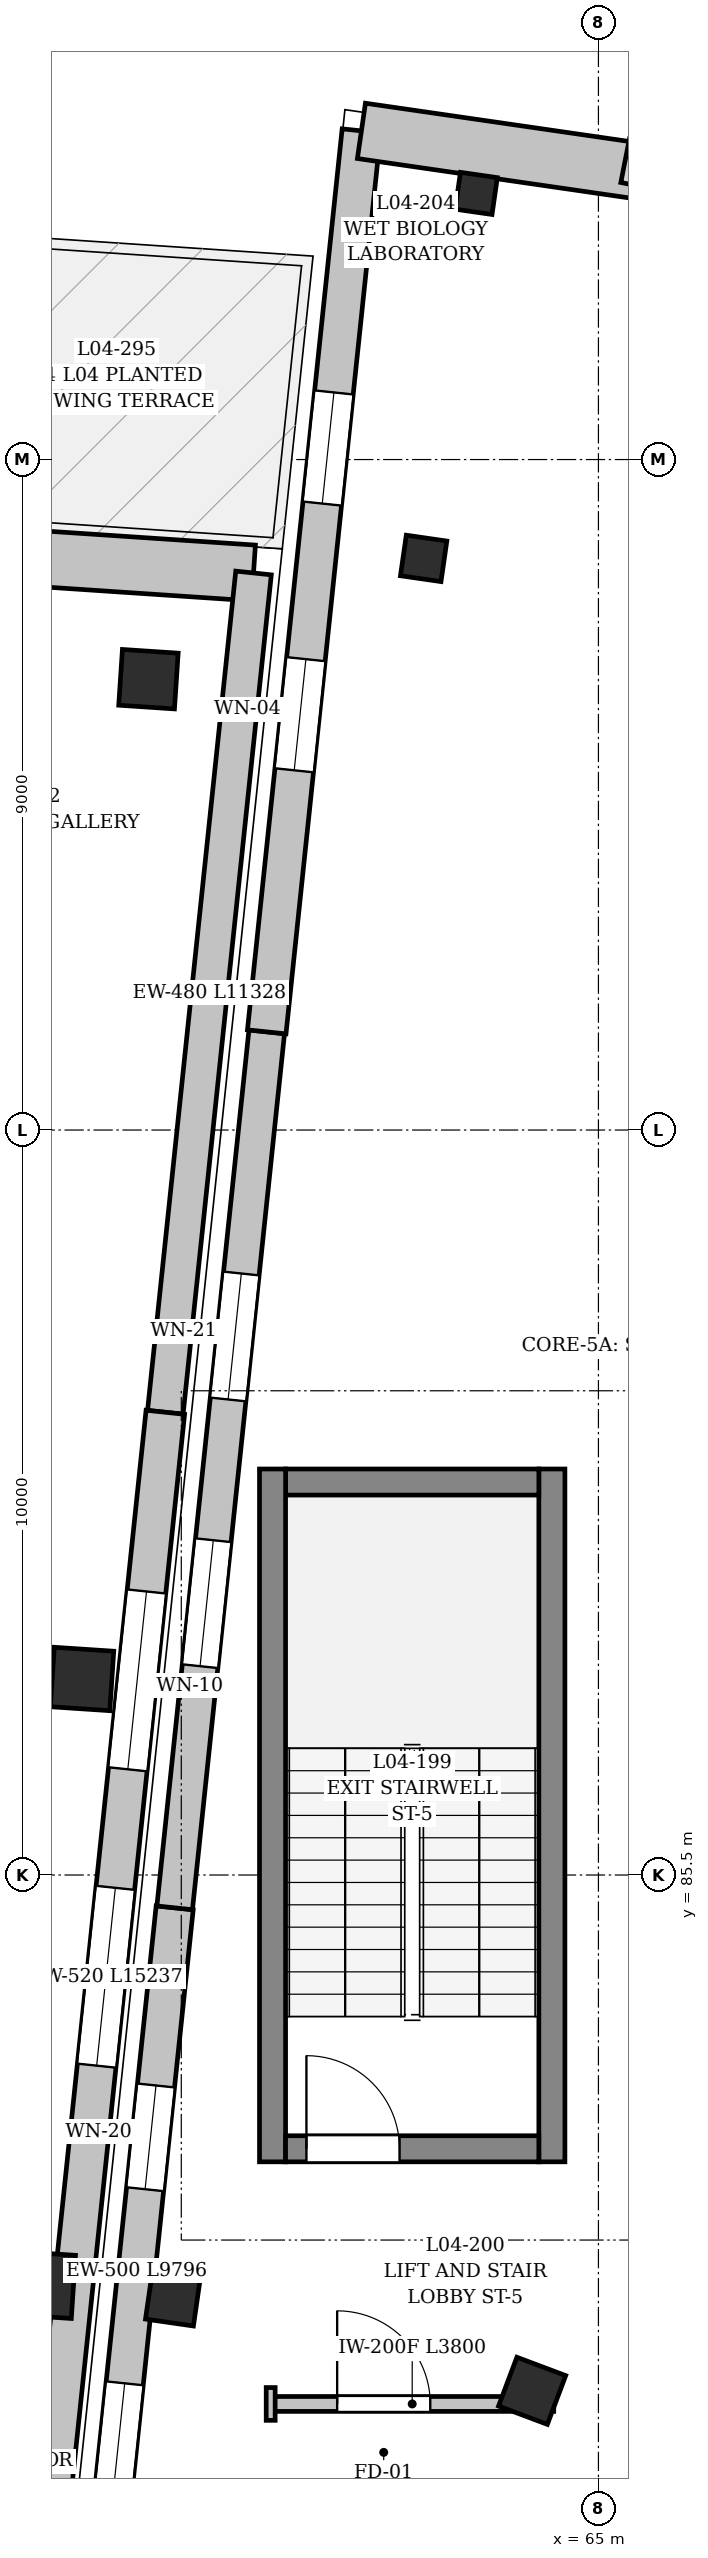
"""IFC4 building model, lengths in metres.
Left out: names, types, materials, properties, quantities, classifications, styles, units other than length and angle.
Written with IfcOpenShell. Run it as: python <this file> out.ifc"""

import sys

from ifc_helpers import new_model, si_unit, direction, frame, frame_2d, origin, origin_2d, place, context, subcontext, project, spatial, rectangle, extrude, element, fill, save


model = new_model("IFC4")
c1 = context("Model", 3, precision=1e-05, world=origin(), true_north=direction((0.0, 1.0)))
c2 = subcontext(c1, "Body", "Model", "MODEL_VIEW")
j1 = project(units=[si_unit("LENGTHUNIT", "METRE"), si_unit("PLANEANGLEUNIT", "RADIAN")], contexts=[c1])
p1 = place(None, origin())
s1 = spatial("IfcSite", under=j1, at=p1, CompositionType="ELEMENT")
p2 = place(p1, origin())
s2 = spatial("IfcBuilding", under=s1, at=p2, CompositionType="ELEMENT")
p3 = place(p2, frame((0.0, 0.0, 15.0)))
s3 = spatial("IfcBuildingStorey", under=s2, at=p3, CompositionType="ELEMENT", Elevation=15.0)
p4 = place(p3, frame((57.528, 79.999, 0.0), z_axis=(0.0, 0.0, 1.0), x_axis=(0.0662739004, 0.997801468292, 0.0)))
e1 = element("IfcColumn", 1, at=p4, inside=s3, PredefinedType="COLUMN", context=c2, shape_type="SweptSolid", body=[
    extrude(rectangle(XDim=0.85, YDim=0.85, at=origin_2d()), origin(), (0.0, 0.0, 1.0), 4.58),
])
p5 = place(p3, frame((58.068, 88.131, 0.0), z_axis=(0.0, 0.0, 1.0), x_axis=(0.0662739004, 0.997801468292, 0.0)))
e2 = element("IfcColumn", 2, at=p5, inside=s3, PredefinedType="COLUMN", context=c2, shape_type="SweptSolid", body=[
    extrude(rectangle(XDim=0.8, YDim=0.8, at=origin_2d()), origin(), (0.0, 0.0, 1.0), 4.58),
])
p6 = place(p3, frame((58.959, 101.552, 0.0), z_axis=(0.0, 0.0, 1.0), x_axis=(0.0662739004, 0.997801468292, 0.0)))
e3 = element("IfcColumn", 3, at=p6, inside=s3, PredefinedType="COLUMN", context=c2, shape_type="SweptSolid", body=[
    extrude(rectangle(XDim=0.75, YDim=0.75, at=origin_2d()), origin(), (0.0, 0.0, 1.0), 4.58),
])
p7 = place(p3, frame((64.11, 78.576, 0.0), z_axis=(0.0, 0.0, 1.0), x_axis=(0.351841648405, 0.936059535739, 0.0)))
e4 = element("IfcColumn", 4, at=p7, inside=s3, PredefinedType="COLUMN", context=c2, shape_type="SweptSolid", body=[
    extrude(rectangle(XDim=0.7, YDim=0.7, at=origin_2d()), origin(), (0.0, 0.0, 1.0), 4.52),
])
p8 = place(p3, frame((59.288, 79.814, 0.0), z_axis=(0.0, 0.0, 1.0), x_axis=(0.142628933706, 0.989776230908, 0.0)))
e5 = element("IfcColumn", 5, at=p8, inside=s3, PredefinedType="COLUMN", context=c2, shape_type="SweptSolid", body=[
    extrude(rectangle(XDim=0.65, YDim=0.65, at=origin_2d()), origin(), (0.0, 0.0, 1.0), 4.52),
])
p9 = place(p3, frame((62.654, 103.173, 0.0), z_axis=(0.0, 0.0, 1.0), x_axis=(0.142628933706, 0.989776230908, 0.0)))
e6 = element("IfcColumn", 6, at=p9, inside=s3, PredefinedType="COLUMN", context=c2, shape_type="SweptSolid", body=[
    extrude(rectangle(XDim=0.55, YDim=0.55, at=origin_2d()), origin(), (0.0, 0.0, 1.0), 4.52),
])
p10 = place(p3, frame((63.36, 108.073, 0.0), z_axis=(0.0, 0.0, 1.0), x_axis=(0.142628933706, 0.989776230908, 0.0)))
e7 = element("IfcColumn", 7, at=p10, inside=s3, PredefinedType="COLUMN", context=c2, shape_type="SweptSolid", body=[
    extrude(rectangle(XDim=0.5, YDim=0.5, at=origin_2d()), origin(), (0.0, 0.0, 1.0), 4.52),
])
p11 = place(p3, frame((57.344, 103.18, 0.0), z_axis=(0.0, 0.0, 1.0), x_axis=(0.997765524506, -0.066812858841, 0.0)))
e8 = element("IfcWall", 8, at=p11, inside=s3, PredefinedType="SOLIDWALL", context=c2, shape_type="SweptSolid", body=[
    extrude(rectangle(XDim=3.033, YDim=0.75, at=frame_2d((1.517, 0.0))), origin(), (0.0, 0.0, 1.0), 4.753),
])
p12 = place(p3, frame((60.37, 102.978, 0.0), z_axis=(0.0, 0.0, 1.0), x_axis=(-0.104525478139, -0.994522209113, 0.0)))
e9 = element("IfcWall", 9, at=p12, inside=s3, PredefinedType="SOLIDWALL", context=c2, shape_type="SweptSolid", body=[
    extrude(rectangle(XDim=11.328, YDim=0.48, at=frame_2d((5.664, 0.0))), origin(), (0.0, 0.0, 1.0), 6.833),
])
p13 = place(p3, frame((59.186, 91.711, 0.0), z_axis=(0.0, 0.0, 1.0), x_axis=(-0.104529652015, -0.994521770425, 0.0)))
e10 = element("IfcWall", 10, at=p13, inside=s3, PredefinedType="SOLIDWALL", context=c2, shape_type="SweptSolid", body=[
    extrude(rectangle(XDim=15.238, YDim=0.52, at=frame_2d((7.619, 0.0))), origin(), (0.0, 0.0, 1.0), 4.753),
])
p14 = place(p13, frame((2.419, 0.0, 0.9)))
e11 = element("IfcOpeningElement", 11, at=p14, cuts=e10, PredefinedType="OPENING", context=c2, shape_type="SweptSolid", body=[
    extrude(rectangle(XDim=2.4, YDim=1.1, at=frame_2d((1.2, 0.55))), frame((0.0, 0.27, 0.0), z_axis=(0.0, -1.0, 0.0), x_axis=(1.0, 0.0, 0.0)), (0.0, 0.0, 1.0), 0.54),
])
p15 = place(p13, frame((6.419, 0.0, 0.9)))
e12 = element("IfcOpeningElement", 12, at=p15, cuts=e10, PredefinedType="OPENING", context=c2, shape_type="SweptSolid", body=[
    extrude(rectangle(XDim=2.4, YDim=1.1, at=frame_2d((1.2, 0.55))), frame((0.0, 0.27, 0.0), z_axis=(0.0, -1.0, 0.0), x_axis=(1.0, 0.0, 0.0)), (0.0, 0.0, 1.0), 0.54),
])
p16 = place(p3, frame((58.287, 75.317, 0.0), z_axis=(0.0, 0.0, 1.0), x_axis=(0.104523915148, 0.994522373384, 0.0)))
e13 = element("IfcWall", 13, at=p16, inside=s3, PredefinedType="SOLIDWALL", context=c2, shape_type="SweptSolid", body=[
    extrude(rectangle(XDim=9.796, YDim=0.5, at=frame_2d((4.898, 0.0))), origin(), (0.0, 0.0, 1.0), 3.66),
])
p17 = place(p16, frame((1.978, 0.0, 0.9)))
e14 = element("IfcOpeningElement", 14, at=p17, cuts=e13, PredefinedType="OPENING", context=c2, shape_type="SweptSolid", body=[
    extrude(rectangle(XDim=1.4, YDim=2.05, at=frame_2d((0.7, 1.025))), frame((0.0, 0.26, 0.0), z_axis=(0.0, -1.0, 0.0), x_axis=(1.0, 0.0, 0.0)), (0.0, 0.0, 1.0), 0.52),
])
p18 = place(p16, frame((5.998, 0.0, 0.9)))
e15 = element("IfcOpeningElement", 15, at=p18, cuts=e13, PredefinedType="OPENING", context=c2, shape_type="SweptSolid", body=[
    extrude(rectangle(XDim=1.4, YDim=2.05, at=frame_2d((0.7, 1.025))), frame((0.0, 0.26, 0.0), z_axis=(0.0, -1.0, 0.0), x_axis=(1.0, 0.0, 0.0)), (0.0, 0.0, 1.0), 0.52),
])
p19 = place(p3, frame((59.311, 85.06, 0.0), z_axis=(0.0, 0.0, 1.0), x_axis=(0.104529993567, 0.994521734526, 0.0)))
e16 = element("IfcWall", 16, at=p19, inside=s3, PredefinedType="SOLIDWALL", context=c2, shape_type="SweptSolid", body=[
    extrude(rectangle(XDim=11.823, YDim=0.48, at=frame_2d((5.911, 0.0))), origin(), (0.0, 0.0, 1.0), 4.52),
])
p20 = place(p19, frame((3.261, 0.0, 0.9)))
e17 = element("IfcOpeningElement", 17, at=p20, cuts=e16, PredefinedType="OPENING", context=c2, shape_type="SweptSolid", body=[
    extrude(rectangle(XDim=1.7, YDim=1.55, at=frame_2d((0.85, 0.775))), frame((0.0, 0.25, 0.0), z_axis=(0.0, -1.0, 0.0), x_axis=(1.0, 0.0, 0.0)), (0.0, 0.0, 1.0), 0.5),
])
p21 = place(p19, frame((6.861, 0.0, 0.9)))
e18 = element("IfcOpeningElement", 18, at=p21, cuts=e16, PredefinedType="OPENING", context=c2, shape_type="SweptSolid", body=[
    extrude(rectangle(XDim=1.7, YDim=1.55, at=frame_2d((0.85, 0.775))), frame((0.0, 0.25, 0.0), z_axis=(0.0, -1.0, 0.0), x_axis=(1.0, 0.0, 0.0)), (0.0, 0.0, 1.0), 0.5),
])
p22 = place(p3, frame((60.547, 96.818, 0.0), z_axis=(0.0, 0.0, 1.0), x_axis=(0.104517571645, 0.994523040064, 0.0)))
e19 = element("IfcWall", 19, at=p22, inside=s3, PredefinedType="SOLIDWALL", context=c2, shape_type="SweptSolid", body=[
    extrude(rectangle(XDim=12.161, YDim=0.52, at=frame_2d((6.08, 0.0))), origin(), (0.0, 0.0, 1.0), 4.52),
])
p23 = place(p22, frame((3.531, 0.0, 0.9)))
e20 = element("IfcOpeningElement", 20, at=p23, cuts=e19, PredefinedType="OPENING", context=c2, shape_type="SweptSolid", body=[
    extrude(rectangle(XDim=1.5, YDim=2.1, at=frame_2d((0.75, 1.05))), frame((0.0, 0.27, 0.0), z_axis=(0.0, -1.0, 0.0), x_axis=(1.0, 0.0, 0.0)), (0.0, 0.0, 1.0), 0.54),
])
p24 = place(p22, frame((7.13, 0.0, 0.9)))
e21 = element("IfcOpeningElement", 21, at=p24, cuts=e19, PredefinedType="OPENING", context=c2, shape_type="SweptSolid", body=[
    extrude(rectangle(XDim=1.5, YDim=2.1, at=frame_2d((0.75, 1.05))), frame((0.0, 0.27, 0.0), z_axis=(0.0, -1.0, 0.0), x_axis=(1.0, 0.0, 0.0)), (0.0, 0.0, 1.0), 0.54),
])
p25 = place(p3, frame((61.818, 108.912, 0.0), z_axis=(0.0, 0.0, 1.0), x_axis=(0.989656438185, -0.143457779009, 0.0)))
e22 = element("IfcWall", 22, at=p25, inside=s3, PredefinedType="SOLIDWALL", context=c2, shape_type="SweptSolid", body=[
    extrude(rectangle(XDim=3.742, YDim=0.75, at=frame_2d((1.871, 0.0))), origin(), (0.0, 0.0, 1.0), 3.11),
])
p26 = place(p3, frame((64.375, 81.65, 0.0), z_axis=(0.0, 0.0, 1.0), x_axis=(0.0, 1.0, 0.0)))
e23 = element("IfcWall", 23, at=p26, inside=s3, PredefinedType="SHEAR", context=c2, shape_type="SweptSolid", body=[
    extrude(rectangle(XDim=9.3, YDim=0.35, at=frame_2d((4.65, 0.0))), origin(), (0.0, 0.0, 1.0), 4.52),
])
p27 = place(p3, frame((64.2, 90.775, 0.0), z_axis=(0.0, 0.0, 1.0), x_axis=(-1.0, 0.0, 0.0)))
e24 = element("IfcWall", 24, at=p27, inside=s3, PredefinedType="SHEAR", context=c2, shape_type="SweptSolid", body=[
    extrude(rectangle(XDim=3.4, YDim=0.35, at=frame_2d((1.7, 0.0))), origin(), (0.0, 0.0, 1.0), 4.52),
])
p28 = place(p3, frame((60.625, 90.95, 0.0), z_axis=(0.0, 0.0, 1.0), x_axis=(0.0, -1.0, 0.0)))
e25 = element("IfcWall", 25, at=p28, inside=s3, PredefinedType="SHEAR", context=c2, shape_type="SweptSolid", body=[
    extrude(rectangle(XDim=9.3, YDim=0.35, at=frame_2d((4.65, 0.0))), origin(), (0.0, 0.0, 1.0), 4.52),
])
p29 = place(p3, frame((60.8, 81.825, 0.0), z_axis=(0.0, 0.0, 1.0), x_axis=(1.0, 0.0, 0.0)))
e26 = element("IfcWall", 26, at=p29, inside=s3, PredefinedType="SHEAR", context=c2, shape_type="SweptSolid", body=[
    extrude(rectangle(XDim=3.4, YDim=0.35, at=frame_2d((1.7, 0.0))), origin(), (0.0, 0.0, 1.0), 4.52),
])
p30 = place(p29, frame((0.28, 0.0, 0.0)))
e27 = element("IfcOpeningElement", 27, at=p30, cuts=e26, PredefinedType="OPENING", context=c2, shape_type="SweptSolid", body=[
    extrude(rectangle(XDim=1.25, YDim=2.2, at=frame_2d((0.625, 1.1))), frame((0.0, 0.185, 0.0), z_axis=(0.0, -1.0, 0.0), x_axis=(1.0, 0.0, 0.0)), (0.0, 0.0, 1.0), 0.37),
])
p31 = place(p3, frame((60.6, 78.4, 0.0), z_axis=(0.0, 0.0, 1.0), x_axis=(1.0, 0.0, 0.0)))
e28 = element("IfcWall", 28, at=p31, inside=s3, PredefinedType="PARTITIONING", context=c2, shape_type="SweptSolid", body=[
    extrude(rectangle(XDim=3.8, YDim=0.2, at=frame_2d((1.9, 0.0))), origin(), (0.0, 0.0, 1.0), 3.11),
])
p32 = place(p31, frame((0.893, 0.0, 0.0)))
e29 = element("IfcOpeningElement", 29, at=p32, cuts=e28, PredefinedType="OPENING", context=c2, shape_type="SweptSolid", body=[
    extrude(rectangle(XDim=1.25, YDim=2.2, at=frame_2d((0.625, 1.1))), frame((0.0, 0.11, 0.0), z_axis=(0.0, -1.0, 0.0), x_axis=(1.0, 0.0, 0.0)), (0.0, 0.0, 1.0), 0.22),
])
p33 = place(p3, frame((60.6, 78.18, 0.0), z_axis=(0.0, 0.0, 1.0), x_axis=(0.0, 1.0, 0.0)))
e30 = element("IfcWall", 30, at=p33, inside=s3, PredefinedType="PARTITIONING", context=c2, shape_type="SweptSolid", body=[
    extrude(rectangle(XDim=0.44, YDim=0.12, at=frame_2d((0.22, 0.0))), origin(), (0.0, 0.0, 1.0), 3.83),
])
p34 = place(p14, origin())
e31 = element("IfcWindow", 31, at=p34, inside=s3, PartitioningType="DOUBLE_PANEL_HORIZONTAL", PredefinedType="LIGHTDOME", context=c2, shape_type="SweptSolid", body=[
    extrude(rectangle(XDim=2.4, YDim=1.1, at=frame_2d((1.2, 0.55))), frame((0.0, 0.03, 0.0), z_axis=(0.0, -1.0, 0.0), x_axis=(1.0, 0.0, 0.0)), (0.0, 0.0, 1.0), 0.06),
])
fill(e11, e31)
p35 = place(p15, origin())
e32 = element("IfcWindow", 32, at=p35, inside=s3, PartitioningType="DOUBLE_PANEL_HORIZONTAL", PredefinedType="LIGHTDOME", context=c2, shape_type="SweptSolid", body=[
    extrude(rectangle(XDim=2.4, YDim=1.1, at=frame_2d((1.2, 0.55))), frame((0.0, 0.03, 0.0), z_axis=(0.0, -1.0, 0.0), x_axis=(1.0, 0.0, 0.0)), (0.0, 0.0, 1.0), 0.06),
])
fill(e12, e32)
p36 = place(p17, origin())
e33 = element("IfcWindow", 33, at=p36, inside=s3, PartitioningType="DOUBLE_PANEL_VERTICAL", PredefinedType="WINDOW", context=c2, shape_type="SweptSolid", body=[
    extrude(rectangle(XDim=1.4, YDim=2.05, at=frame_2d((0.7, 1.025))), frame((0.0, 0.03, 0.0), z_axis=(0.0, -1.0, 0.0), x_axis=(1.0, 0.0, 0.0)), (0.0, 0.0, 1.0), 0.06),
])
fill(e14, e33)
p37 = place(p18, origin())
e34 = element("IfcWindow", 34, at=p37, inside=s3, PartitioningType="DOUBLE_PANEL_VERTICAL", PredefinedType="WINDOW", context=c2, shape_type="SweptSolid", body=[
    extrude(rectangle(XDim=1.4, YDim=2.05, at=frame_2d((0.7, 1.025))), frame((0.0, 0.03, 0.0), z_axis=(0.0, -1.0, 0.0), x_axis=(1.0, 0.0, 0.0)), (0.0, 0.0, 1.0), 0.06),
])
fill(e15, e34)
p38 = place(p20, origin())
e35 = element("IfcWindow", 35, at=p38, inside=s3, PartitioningType="DOUBLE_PANEL_VERTICAL", PredefinedType="WINDOW", context=c2, shape_type="SweptSolid", body=[
    extrude(rectangle(XDim=1.7, YDim=1.55, at=frame_2d((0.85, 0.775))), frame((0.0, 0.03, 0.0), z_axis=(0.0, -1.0, 0.0), x_axis=(1.0, 0.0, 0.0)), (0.0, 0.0, 1.0), 0.06),
])
fill(e17, e35)
p39 = place(p21, origin())
e36 = element("IfcWindow", 36, at=p39, inside=s3, PartitioningType="DOUBLE_PANEL_VERTICAL", PredefinedType="WINDOW", context=c2, shape_type="SweptSolid", body=[
    extrude(rectangle(XDim=1.7, YDim=1.55, at=frame_2d((0.85, 0.775))), frame((0.0, 0.03, 0.0), z_axis=(0.0, -1.0, 0.0), x_axis=(1.0, 0.0, 0.0)), (0.0, 0.0, 1.0), 0.06),
])
fill(e18, e36)
p40 = place(p23, origin())
e37 = element("IfcWindow", 37, at=p40, inside=s3, PartitioningType="DOUBLE_PANEL_VERTICAL", PredefinedType="WINDOW", context=c2, shape_type="SweptSolid", body=[
    extrude(rectangle(XDim=1.5, YDim=2.1, at=frame_2d((0.75, 1.05))), frame((0.0, 0.03, 0.0), z_axis=(0.0, -1.0, 0.0), x_axis=(1.0, 0.0, 0.0)), (0.0, 0.0, 1.0), 0.06),
])
fill(e20, e37)
p41 = place(p24, origin())
e38 = element("IfcWindow", 38, at=p41, inside=s3, PartitioningType="DOUBLE_PANEL_VERTICAL", PredefinedType="WINDOW", context=c2, shape_type="SweptSolid", body=[
    extrude(rectangle(XDim=1.5, YDim=2.1, at=frame_2d((0.75, 1.05))), frame((0.0, 0.03, 0.0), z_axis=(0.0, -1.0, 0.0), x_axis=(1.0, 0.0, 0.0)), (0.0, 0.0, 1.0), 0.06),
])
fill(e21, e38)
p42 = place(p30, origin())
e39 = element("IfcDoor", 39, at=p42, inside=s3, OperationType="SINGLE_SWING_LEFT", PredefinedType="DOOR", context=c2, shape_type="SweptSolid", body=[
    extrude(rectangle(XDim=1.25, YDim=2.2, at=frame_2d((0.625, 1.1))), frame((0.0, 0.025, 0.0), z_axis=(0.0, -1.0, 0.0), x_axis=(1.0, 0.0, 0.0)), (0.0, 0.0, 1.0), 0.05),
])
fill(e27, e39)
p43 = place(p32, origin())
e40 = element("IfcDoor", 40, at=p43, inside=s3, OperationType="SINGLE_SWING_LEFT", PredefinedType="DOOR", context=c2, shape_type="SweptSolid", body=[
    extrude(rectangle(XDim=1.25, YDim=2.2, at=frame_2d((0.625, 1.1))), frame((0.0, 0.025, 0.0), z_axis=(0.0, -1.0, 0.0), x_axis=(1.0, 0.0, 0.0)), (0.0, 0.0, 1.0), 0.05),
])
fill(e29, e40)
save(model, sys.argv[1])
